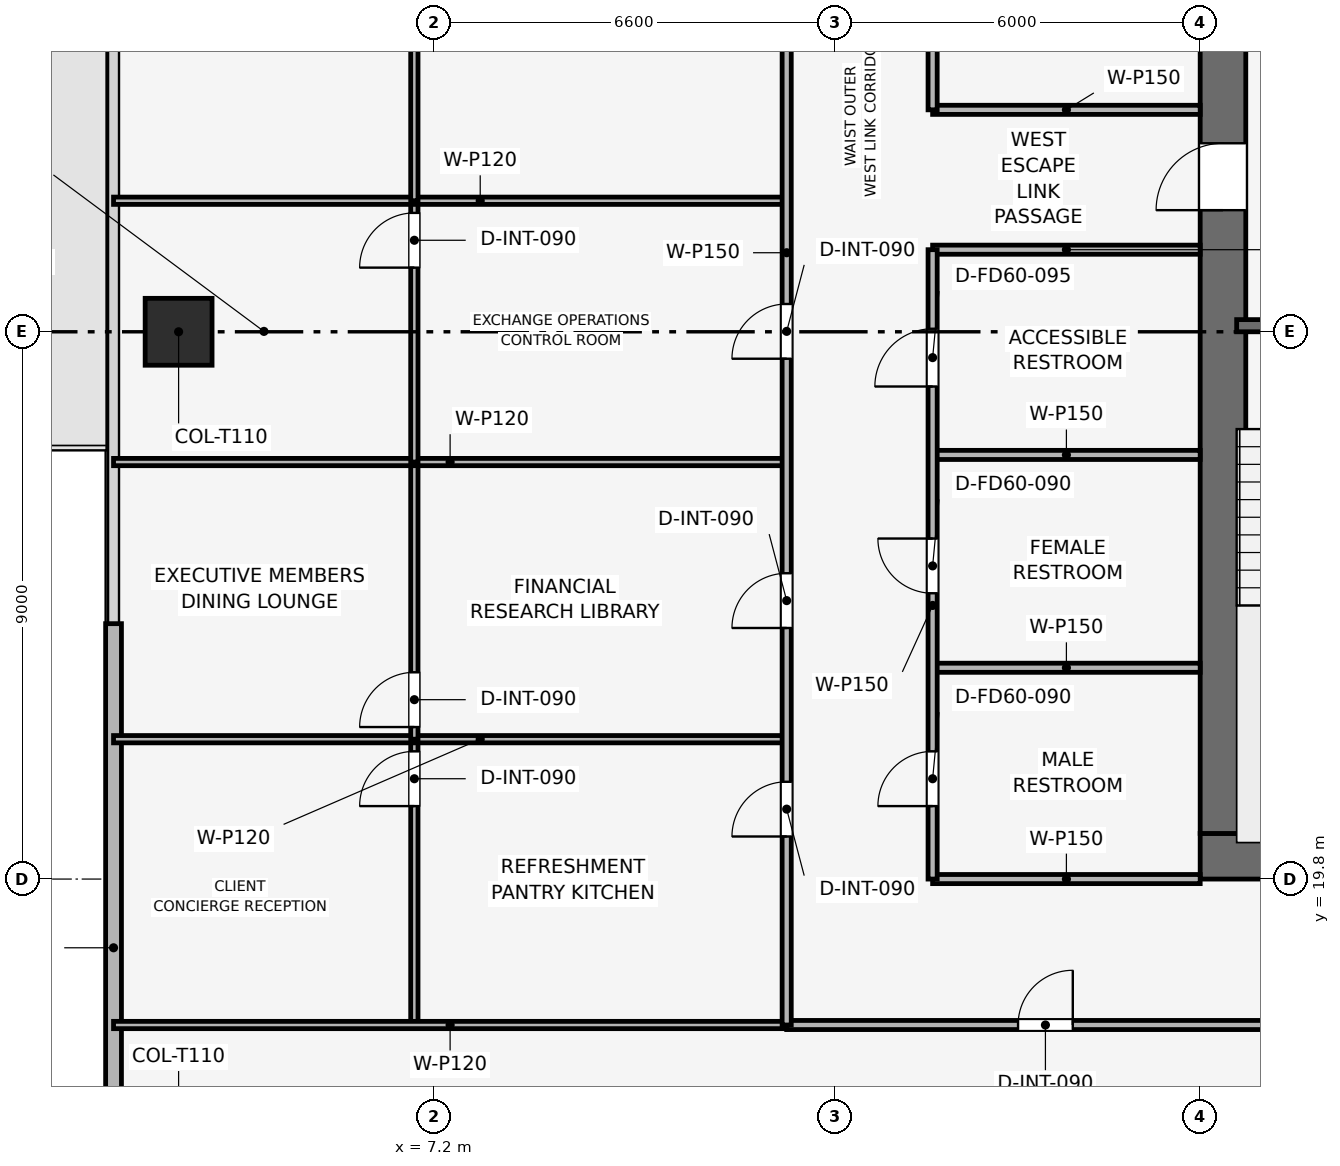
"""IFC4 building model, lengths in metres.
Left out: names, types, materials, properties, quantities, classifications, styles, units other than length and angle.
Written with IfcOpenShell. Run it as: python <this file> out.ifc"""

import sys

from ifc_helpers import new_model, si_unit, direction, frame, frame_2d, origin, origin_2d, place, context, subcontext, project, spatial, rectangle, extrude, element, fill, save


model = new_model("IFC4")
c1 = context("Model", 3, precision=1e-05, world=origin(), true_north=direction((0.0, 1.0)))
c2 = subcontext(c1, "Body", "Model", "MODEL_VIEW")
j1 = project(units=[si_unit("LENGTHUNIT", "METRE"), si_unit("PLANEANGLEUNIT", "RADIAN")], contexts=[c1])
p1 = place(None, origin())
s1 = spatial("IfcSite", under=j1, at=p1, CompositionType="ELEMENT")
p2 = place(p1, origin())
s2 = spatial("IfcBuilding", under=s1, at=p2, CompositionType="ELEMENT")
p3 = place(p2, frame((0.0, 0.0, 229.95)))
s3 = spatial("IfcBuildingStorey", under=s2, at=p3, CompositionType="ELEMENT", Elevation=229.95)
p4 = place(p3, frame((19.8, 20.175, 0.0), z_axis=(0.0, 0.0, 1.0), x_axis=(1.0, 0.0, 0.0)))
e1 = element("IfcWall", 1, at=p4, inside=s3, PredefinedType="SHEAR", context=c2, shape_type="SweptSolid", body=[
    extrude(rectangle(XDim=18.0, YDim=0.75, at=frame_2d((9.0, 0.0))), origin(), (0.0, 0.0, 1.0), 3.75),
])
p5 = place(p4, frame((8.4, 0.0, 0.0)))
e2 = element("IfcOpeningElement", 2, at=p5, cuts=e1, PredefinedType="OPENING", context=c2, shape_type="SweptSolid", body=[
    extrude(rectangle(XDim=1.2, YDim=2.2, at=frame_2d((0.6, 1.1))), frame((0.0, 0.385, 0.0), z_axis=(0.0, -1.0, 0.0), x_axis=(1.0, 0.0, 0.0)), (0.0, 0.0, 1.0), 0.77),
])
p6 = place(p3, frame((20.175, 20.55, 0.0), z_axis=(0.0, 0.0, 1.0), x_axis=(0.0, 1.0, 0.0)))
e3 = element("IfcWall", 3, at=p6, inside=s3, PredefinedType="SHEAR", context=c2, shape_type="SweptSolid", body=[
    extrude(rectangle(XDim=16.5, YDim=0.75, at=frame_2d((8.25, 0.0))), origin(), (0.0, 0.0, 1.0), 3.75),
])
p7 = place(p6, frame((10.25, 0.0, 0.0)))
e4 = element("IfcOpeningElement", 4, at=p7, cuts=e3, PredefinedType="OPENING", context=c2, shape_type="SweptSolid", body=[
    extrude(rectangle(XDim=1.1, YDim=2.15, at=frame_2d((0.55, 1.075))), frame((0.0, 0.385, 0.0), z_axis=(0.0, -1.0, 0.0), x_axis=(1.0, 0.0, 0.0)), (0.0, 0.0, 1.0), 0.77),
])
p8 = place(p3, frame((3.0, 28.8, 0.003), z_axis=(0.0, 0.0, 1.0), x_axis=(1.0, 0.0, 0.0)))
e5 = element("IfcColumn", 5, at=p8, inside=s3, PredefinedType="COLUMN", context=c2, shape_type="SweptSolid", body=[
    extrude(rectangle(XDim=1.1, YDim=1.1, at=origin_2d()), origin(), (0.0, 0.0, 1.0), 3.494),
])
p9 = place(p3, frame((1.93, 9.3, 0.0), z_axis=(0.0, 0.0, 1.0), x_axis=(0.0, 1.0, 0.0)))
e6 = element("IfcWall", 6, at=p9, inside=s3, PredefinedType="SOLIDWALL", context=c2, shape_type="SweptSolid", body=[
    extrude(rectangle(XDim=14.7, YDim=0.26, at=frame_2d((7.35, 0.0))), origin(), (0.0, 0.0, 1.0), 3.5),
])
p10 = place(p9, frame((0.25, 0.0, 0.9)))
e7 = element("IfcOpeningElement", 7, at=p10, cuts=e6, PredefinedType="OPENING", context=c2, shape_type="SweptSolid", body=[
    extrude(rectangle(XDim=3.8, YDim=1.9, at=frame_2d((1.9, 0.95))), frame((0.0, 0.14, 0.0), z_axis=(0.0, -1.0, 0.0), x_axis=(1.0, 0.0, 0.0)), (0.0, 0.0, 1.0), 0.28),
])
p11 = place(p3, frame((20.4, 28.9, 0.0), z_axis=(0.0, 0.0, 1.0), x_axis=(1.0, 0.0, 0.0)))
e8 = element("IfcWall", 8, at=p11, inside=s3, PredefinedType="SHEAR", context=c2, shape_type="SweptSolid", body=[
    extrude(rectangle(XDim=3.15, YDim=0.2, at=frame_2d((1.575, 0.0))), origin(), (0.0, 0.0, 1.0), 3.5),
])
p12 = place(p11, frame((0.8, 0.0, 0.0)))
e9 = element("IfcOpeningElement", 9, at=p12, cuts=e8, PredefinedType="OPENING", context=c2, shape_type="SweptSolid", body=[
    extrude(rectangle(XDim=1.0, YDim=2.1, at=frame_2d((0.5, 1.05))), frame((0.0, 0.11, 0.0), z_axis=(0.0, -1.0, 0.0), x_axis=(1.0, 0.0, 0.0)), (0.0, 0.0, 1.0), 0.22),
])
p13 = place(p3, frame((15.4, 19.8, 0.0), z_axis=(0.0, 0.0, 1.0), x_axis=(1.0, 0.0, 0.0)))
e10 = element("IfcWall", 10, at=p13, inside=s3, PredefinedType="PARTITIONING", context=c2, shape_type="SweptSolid", body=[
    extrude(rectangle(XDim=4.4, YDim=0.15, at=frame_2d((2.2, 0.0))), origin(), (0.0, 0.0, 1.0), 3.035),
])
for number, where, z_axis, x_axis in (
    (11, (15.4, 23.275, 0.0), (0.0, 0.0, 1.0), (1.0, 0.0, 0.0)),
    (12, (15.4, 26.775, 0.0), (0.0, 0.0, 1.0), (1.0, 0.0, 0.0)),
    (13, (15.4, 30.15, 0.0), (0.0, 0.0, 1.0), (1.0, 0.0, 0.0)),
    (14, (15.4, 32.45, 0.0), (0.0, 0.0, 1.0), (1.0, 0.0, 0.0)),
):
    element("IfcWall", number, at=place(p3, frame(where, z_axis=z_axis, x_axis=x_axis)), inside=s3, PredefinedType="PARTITIONING", context=c2, shape_type="SweptSolid", body=[
        extrude(rectangle(XDim=4.4, YDim=0.15, at=frame_2d((2.2, 0.0))), origin(), (0.0, 0.0, 1.0), 3.5),
    ])
p14 = place(p3, frame((15.4, 19.8, 0.0), z_axis=(0.0, 0.0, 1.0), x_axis=(0.0, 1.0, 0.0)))
e15 = element("IfcWall", 15, at=p14, inside=s3, PredefinedType="PARTITIONING", context=c2, shape_type="SweptSolid", body=[
    extrude(rectangle(XDim=10.35, YDim=0.15, at=frame_2d((5.175, 0.0))), origin(), (0.0, 0.0, 1.0), 3.035),
])
p15 = place(p14, frame((1.2, 0.0, 0.0)))
e16 = element("IfcOpeningElement", 16, at=p15, cuts=e15, PredefinedType="OPENING", context=c2, shape_type="SweptSolid", body=[
    extrude(rectangle(XDim=0.9, YDim=2.1, at=frame_2d((0.45, 1.05))), frame((0.0, 0.085, 0.0), z_axis=(0.0, -1.0, 0.0), x_axis=(1.0, 0.0, 0.0)), (0.0, 0.0, 1.0), 0.17),
])
p16 = place(p14, frame((4.7, 0.0, 0.0)))
e17 = element("IfcOpeningElement", 17, at=p16, cuts=e15, PredefinedType="OPENING", context=c2, shape_type="SweptSolid", body=[
    extrude(rectangle(XDim=0.9, YDim=2.1, at=frame_2d((0.45, 1.05))), frame((0.0, 0.085, 0.0), z_axis=(0.0, -1.0, 0.0), x_axis=(1.0, 0.0, 0.0)), (0.0, 0.0, 1.0), 0.17),
])
p17 = place(p14, frame((8.1, 0.0, 0.0)))
e18 = element("IfcOpeningElement", 18, at=p17, cuts=e15, PredefinedType="OPENING", context=c2, shape_type="SweptSolid", body=[
    extrude(rectangle(XDim=0.95, YDim=2.1, at=frame_2d((0.475, 1.05))), frame((0.0, 0.085, 0.0), z_axis=(0.0, -1.0, 0.0), x_axis=(1.0, 0.0, 0.0)), (0.0, 0.0, 1.0), 0.17),
])
p18 = place(p3, frame((15.4, 32.45, 0.0), z_axis=(0.0, 0.0, 1.0), x_axis=(0.0, 1.0, 0.0)))
e19 = element("IfcWall", 19, at=p18, inside=s3, PredefinedType="PARTITIONING", context=c2, shape_type="SweptSolid", body=[
    extrude(rectangle(XDim=5.35, YDim=0.15, at=frame_2d((2.675, 0.0))), origin(), (0.0, 0.0, 1.0), 3.035),
])
p19 = place(p18, frame((2.1, 0.0, 0.0)))
e20 = element("IfcOpeningElement", 20, at=p19, cuts=e19, PredefinedType="OPENING", context=c2, shape_type="SweptSolid", body=[
    extrude(rectangle(XDim=0.9, YDim=2.1, at=frame_2d((0.45, 1.05))), frame((0.0, 0.085, 0.0), z_axis=(0.0, -1.0, 0.0), x_axis=(1.0, 0.0, 0.0)), (0.0, 0.0, 1.0), 0.17),
])
p20 = place(p3, frame((6.877, 17.4, 0.0), z_axis=(0.0, 0.0, 1.0), x_axis=(0.0, 1.0, 0.0)))
e21 = element("IfcWall", 21, at=p20, inside=s3, PredefinedType="PARTITIONING", context=c2, shape_type="SweptSolid", body=[
    extrude(rectangle(XDim=4.7, YDim=0.12, at=frame_2d((2.35, 0.0))), origin(), (0.0, 0.0, 1.0), 3.035),
])
p21 = place(p20, frame((3.6, 0.0, 0.0)))
e22 = element("IfcOpeningElement", 22, at=p21, cuts=e21, PredefinedType="OPENING", context=c2, shape_type="SweptSolid", body=[
    extrude(rectangle(XDim=0.9, YDim=2.1, at=frame_2d((0.45, 1.05))), frame((0.0, 0.07, 0.0), z_axis=(0.0, -1.0, 0.0), x_axis=(1.0, 0.0, 0.0)), (0.0, 0.0, 1.0), 0.14),
])
p22 = place(p3, frame((1.93, 22.1, 0.0), z_axis=(0.0, 0.0, 1.0), x_axis=(1.0, 0.0, 0.0)))
e23 = element("IfcWall", 23, at=p22, inside=s3, PredefinedType="PARTITIONING", context=c2, shape_type="SweptSolid", body=[
    extrude(rectangle(XDim=11.07, YDim=0.12, at=frame_2d((5.535, 0.0))), origin(), (0.0, 0.0, 1.0), 2.885),
])
p23 = place(p3, frame((6.877, 22.1, 0.0), z_axis=(0.0, 0.0, 1.0), x_axis=(0.0, 1.0, 0.0)))
e24 = element("IfcWall", 24, at=p23, inside=s3, PredefinedType="PARTITIONING", context=c2, shape_type="SweptSolid", body=[
    extrude(rectangle(XDim=4.558, YDim=0.12, at=frame_2d((2.279, 0.0))), origin(), (0.0, 0.0, 1.0), 3.5),
])
p24 = place(p23, frame((0.2, 0.0, 0.0)))
e25 = element("IfcOpeningElement", 25, at=p24, cuts=e24, PredefinedType="OPENING", context=c2, shape_type="SweptSolid", body=[
    extrude(rectangle(XDim=0.9, YDim=2.1, at=frame_2d((0.45, 1.05))), frame((0.0, 0.07, 0.0), z_axis=(0.0, -1.0, 0.0), x_axis=(1.0, 0.0, 0.0)), (0.0, 0.0, 1.0), 0.14),
])
p25 = place(p3, frame((1.93, 26.658, 0.0), z_axis=(0.0, 0.0, 1.0), x_axis=(1.0, 0.0, 0.0)))
e26 = element("IfcWall", 26, at=p25, inside=s3, PredefinedType="PARTITIONING", context=c2, shape_type="SweptSolid", body=[
    extrude(rectangle(XDim=11.07, YDim=0.12, at=frame_2d((5.535, 0.0))), origin(), (0.0, 0.0, 1.0), 2.885),
])
p26 = place(p3, frame((6.877, 26.658, 0.0), z_axis=(0.0, 0.0, 1.0), x_axis=(0.0, 1.0, 0.0)))
e27 = element("IfcWall", 27, at=p26, inside=s3, PredefinedType="PARTITIONING", context=c2, shape_type="SweptSolid", body=[
    extrude(rectangle(XDim=4.297, YDim=0.12, at=frame_2d((2.148, 0.0))), origin(), (0.0, 0.0, 1.0), 3.035),
])
p27 = place(p26, frame((3.197, 0.0, 0.0)))
e28 = element("IfcOpeningElement", 28, at=p27, cuts=e27, PredefinedType="OPENING", context=c2, shape_type="SweptSolid", body=[
    extrude(rectangle(XDim=0.9, YDim=2.1, at=frame_2d((0.45, 1.05))), frame((0.0, 0.07, 0.0), z_axis=(0.0, -1.0, 0.0), x_axis=(1.0, 0.0, 0.0)), (0.0, 0.0, 1.0), 0.14),
])
p28 = place(p3, frame((1.93, 30.955, 0.0), z_axis=(0.0, 0.0, 1.0), x_axis=(1.0, 0.0, 0.0)))
e29 = element("IfcWall", 29, at=p28, inside=s3, PredefinedType="PARTITIONING", context=c2, shape_type="SweptSolid", body=[
    extrude(rectangle(XDim=11.07, YDim=0.12, at=frame_2d((5.535, 0.0))), origin(), (0.0, 0.0, 1.0), 2.885),
])
p29 = place(p3, frame((6.877, 30.955, 0.0), z_axis=(0.0, 0.0, 1.0), x_axis=(0.0, 1.0, 0.0)))
e30 = element("IfcWall", 30, at=p29, inside=s3, PredefinedType="PARTITIONING", context=c2, shape_type="SweptSolid", body=[
    extrude(rectangle(XDim=9.245, YDim=0.12, at=frame_2d((4.623, 0.0))), origin(), (0.0, 0.0, 1.0), 3.035),
])
p30 = place(p29, frame((4.173, 0.0, 0.0)))
e31 = element("IfcOpeningElement", 31, at=p30, cuts=e30, PredefinedType="OPENING", context=c2, shape_type="SweptSolid", body=[
    extrude(rectangle(XDim=0.9, YDim=2.1, at=frame_2d((0.45, 1.05))), frame((0.0, 0.07, 0.0), z_axis=(0.0, -1.0, 0.0), x_axis=(1.0, 0.0, 0.0)), (0.0, 0.0, 1.0), 0.14),
])
p31 = place(p3, frame((1.93, 17.4, 0.0), z_axis=(0.0, 0.0, 1.0), x_axis=(1.0, 0.0, 0.0)))
e32 = element("IfcWall", 32, at=p31, inside=s3, PredefinedType="PARTITIONING", context=c2, shape_type="SweptSolid", body=[
    extrude(rectangle(XDim=11.07, YDim=0.12, at=frame_2d((5.535, 0.0))), origin(), (0.0, 0.0, 1.0), 2.885),
])
p32 = place(p3, frame((13.0, 17.4, 0.0), z_axis=(0.0, 0.0, 1.0), x_axis=(1.0, 0.0, 0.0)))
e33 = element("IfcWall", 33, at=p32, inside=s3, PredefinedType="PARTITIONING", context=c2, shape_type="SweptSolid", body=[
    extrude(rectangle(XDim=31.6, YDim=0.15, at=frame_2d((15.8, 0.0))), origin(), (0.0, 0.0, 1.0), 3.035),
])
p33 = place(p32, frame((3.805, 0.0, 0.0)))
e34 = element("IfcOpeningElement", 34, at=p33, cuts=e33, PredefinedType="OPENING", context=c2, shape_type="SweptSolid", body=[
    extrude(rectangle(XDim=0.9, YDim=2.1, at=frame_2d((0.45, 1.05))), frame((0.0, 0.085, 0.0), z_axis=(0.0, -1.0, 0.0), x_axis=(1.0, 0.0, 0.0)), (0.0, 0.0, 1.0), 0.17),
])
p34 = place(p32, frame((19.605, 0.0, 0.0)))
e35 = element("IfcOpeningElement", 35, at=p34, cuts=e33, PredefinedType="OPENING", context=c2, shape_type="SweptSolid", body=[
    extrude(rectangle(XDim=0.9, YDim=2.1, at=frame_2d((0.45, 1.05))), frame((0.0, 0.085, 0.0), z_axis=(0.0, -1.0, 0.0), x_axis=(1.0, 0.0, 0.0)), (0.0, 0.0, 1.0), 0.17),
])
p35 = place(p3, frame((13.0, 17.4, 0.0), z_axis=(0.0, 0.0, 1.0), x_axis=(0.0, 1.0, 0.0)))
e36 = element("IfcWall", 36, at=p35, inside=s3, PredefinedType="PARTITIONING", context=c2, shape_type="SweptSolid", body=[
    extrude(rectangle(XDim=22.8, YDim=0.15, at=frame_2d((11.4, 0.0))), origin(), (0.0, 0.0, 1.0), 3.035),
])
p36 = place(p35, frame((3.1, 0.0, 0.0)))
e37 = element("IfcOpeningElement", 37, at=p36, cuts=e36, PredefinedType="OPENING", context=c2, shape_type="SweptSolid", body=[
    extrude(rectangle(XDim=0.9, YDim=2.1, at=frame_2d((0.45, 1.05))), frame((0.0, 0.085, 0.0), z_axis=(0.0, -1.0, 0.0), x_axis=(1.0, 0.0, 0.0)), (0.0, 0.0, 1.0), 0.17),
])
p37 = place(p35, frame((6.529, 0.0, 0.0)))
e38 = element("IfcOpeningElement", 38, at=p37, cuts=e36, PredefinedType="OPENING", context=c2, shape_type="SweptSolid", body=[
    extrude(rectangle(XDim=0.9, YDim=2.1, at=frame_2d((0.45, 1.05))), frame((0.0, 0.085, 0.0), z_axis=(0.0, -1.0, 0.0), x_axis=(1.0, 0.0, 0.0)), (0.0, 0.0, 1.0), 0.17),
])
p38 = place(p35, frame((10.957, 0.0, 0.0)))
e39 = element("IfcOpeningElement", 39, at=p38, cuts=e36, PredefinedType="OPENING", context=c2, shape_type="SweptSolid", body=[
    extrude(rectangle(XDim=0.9, YDim=2.1, at=frame_2d((0.45, 1.05))), frame((0.0, 0.085, 0.0), z_axis=(0.0, -1.0, 0.0), x_axis=(1.0, 0.0, 0.0)), (0.0, 0.0, 1.0), 0.17),
])
p39 = place(p35, frame((16.527, 0.0, 0.0)))
e40 = element("IfcOpeningElement", 40, at=p39, cuts=e36, PredefinedType="OPENING", context=c2, shape_type="SweptSolid", body=[
    extrude(rectangle(XDim=0.9, YDim=2.1, at=frame_2d((0.45, 1.05))), frame((0.0, 0.085, 0.0), z_axis=(0.0, -1.0, 0.0), x_axis=(1.0, 0.0, 0.0)), (0.0, 0.0, 1.0), 0.17),
])
p40 = place(p15, origin())
e41 = element("IfcDoor", 41, at=p40, inside=s3, OperationType="SINGLE_SWING_LEFT", PredefinedType="DOOR", context=c2, shape_type="SweptSolid", body=[
    extrude(rectangle(XDim=0.9, YDim=2.1, at=frame_2d((0.45, 1.05))), frame((0.0, 0.025, 0.0), z_axis=(0.0, -1.0, 0.0), x_axis=(1.0, 0.0, 0.0)), (0.0, 0.0, 1.0), 0.05),
])
fill(e16, e41)
p41 = place(p16, origin())
e42 = element("IfcDoor", 42, at=p41, inside=s3, OperationType="SINGLE_SWING_RIGHT", PredefinedType="DOOR", context=c2, shape_type="SweptSolid", body=[
    extrude(rectangle(XDim=0.9, YDim=2.1, at=frame_2d((0.45, 1.05))), frame((0.0, 0.025, 0.0), z_axis=(0.0, -1.0, 0.0), x_axis=(1.0, 0.0, 0.0)), (0.0, 0.0, 1.0), 0.05),
])
fill(e17, e42)
p42 = place(p17, origin())
e43 = element("IfcDoor", 43, at=p42, inside=s3, OperationType="SINGLE_SWING_LEFT", PredefinedType="DOOR", context=c2, shape_type="SweptSolid", body=[
    extrude(rectangle(XDim=0.95, YDim=2.1, at=frame_2d((0.475, 1.05))), frame((0.0, 0.025, 0.0), z_axis=(0.0, -1.0, 0.0), x_axis=(1.0, 0.0, 0.0)), (0.0, 0.0, 1.0), 0.05),
])
fill(e18, e43)
p43 = place(p21, origin())
e44 = element("IfcDoor", 44, at=p43, inside=s3, OperationType="SINGLE_SWING_LEFT", PredefinedType="DOOR", context=c2, shape_type="SweptSolid", body=[
    extrude(rectangle(XDim=0.9, YDim=2.1, at=frame_2d((0.45, 1.05))), frame((0.0, 0.025, 0.0), z_axis=(0.0, -1.0, 0.0), x_axis=(1.0, 0.0, 0.0)), (0.0, 0.0, 1.0), 0.05),
])
fill(e22, e44)
p44 = place(p24, origin())
e45 = element("IfcDoor", 45, at=p44, inside=s3, OperationType="SINGLE_SWING_LEFT", PredefinedType="DOOR", context=c2, shape_type="SweptSolid", body=[
    extrude(rectangle(XDim=0.9, YDim=2.1, at=frame_2d((0.45, 1.05))), frame((0.0, 0.025, 0.0), z_axis=(0.0, -1.0, 0.0), x_axis=(1.0, 0.0, 0.0)), (0.0, 0.0, 1.0), 0.05),
])
fill(e25, e45)
p45 = place(p27, origin())
e46 = element("IfcDoor", 46, at=p45, inside=s3, OperationType="SINGLE_SWING_LEFT", PredefinedType="DOOR", context=c2, shape_type="SweptSolid", body=[
    extrude(rectangle(XDim=0.9, YDim=2.1, at=frame_2d((0.45, 1.05))), frame((0.0, 0.025, 0.0), z_axis=(0.0, -1.0, 0.0), x_axis=(1.0, 0.0, 0.0)), (0.0, 0.0, 1.0), 0.05),
])
fill(e28, e46)
p46 = place(p33, origin())
e47 = element("IfcDoor", 47, at=p46, inside=s3, OperationType="SINGLE_SWING_RIGHT", PredefinedType="DOOR", context=c2, shape_type="SweptSolid", body=[
    extrude(rectangle(XDim=0.9, YDim=2.1, at=frame_2d((0.45, 1.05))), frame((0.0, 0.025, 0.0), z_axis=(0.0, -1.0, 0.0), x_axis=(1.0, 0.0, 0.0)), (0.0, 0.0, 1.0), 0.05),
])
fill(e34, e47)
p47 = place(p36, origin())
e48 = element("IfcDoor", 48, at=p47, inside=s3, OperationType="SINGLE_SWING_LEFT", PredefinedType="DOOR", context=c2, shape_type="SweptSolid", body=[
    extrude(rectangle(XDim=0.9, YDim=2.1, at=frame_2d((0.45, 1.05))), frame((0.0, 0.025, 0.0), z_axis=(0.0, -1.0, 0.0), x_axis=(1.0, 0.0, 0.0)), (0.0, 0.0, 1.0), 0.05),
])
fill(e37, e48)
p48 = place(p37, origin())
e49 = element("IfcDoor", 49, at=p48, inside=s3, OperationType="SINGLE_SWING_LEFT", PredefinedType="DOOR", context=c2, shape_type="SweptSolid", body=[
    extrude(rectangle(XDim=0.9, YDim=2.1, at=frame_2d((0.45, 1.05))), frame((0.0, 0.025, 0.0), z_axis=(0.0, -1.0, 0.0), x_axis=(1.0, 0.0, 0.0)), (0.0, 0.0, 1.0), 0.05),
])
fill(e38, e49)
p49 = place(p38, origin())
e50 = element("IfcDoor", 50, at=p49, inside=s3, OperationType="SINGLE_SWING_LEFT", PredefinedType="DOOR", context=c2, shape_type="SweptSolid", body=[
    extrude(rectangle(XDim=0.9, YDim=2.1, at=frame_2d((0.45, 1.05))), frame((0.0, 0.025, 0.0), z_axis=(0.0, -1.0, 0.0), x_axis=(1.0, 0.0, 0.0)), (0.0, 0.0, 1.0), 0.05),
])
fill(e39, e50)
p50 = place(p7, origin())
e51 = element("IfcDoor", 51, at=p50, inside=s3, OperationType="SINGLE_SWING_LEFT", PredefinedType="DOOR", context=c2, shape_type="SweptSolid", body=[
    extrude(rectangle(XDim=1.1, YDim=2.15, at=frame_2d((0.55, 1.075))), frame((0.0, 0.025, 0.0), z_axis=(0.0, -1.0, 0.0), x_axis=(1.0, 0.0, 0.0)), (0.0, 0.0, 1.0), 0.05),
])
fill(e4, e51)
save(model, sys.argv[1])
